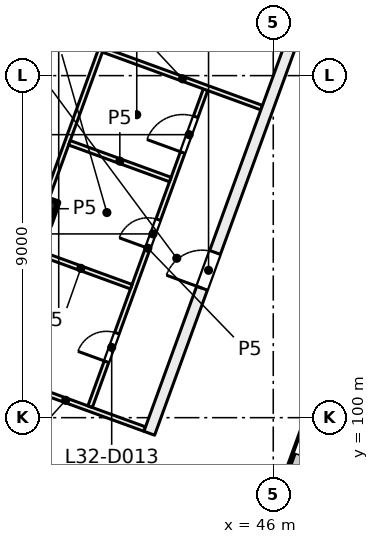
"""IFC4 building model, lengths in metres.
Left out: names, types, materials, properties, quantities, classifications, styles, units other than length and angle.
Written with IfcOpenShell. Run it as: python <this file> out.ifc"""

import sys

from ifc_helpers import new_model, si_unit, direction, frame, frame_2d, origin, origin_2d, place, context, subcontext, project, spatial, rectangle, extrude, element, fill, save


model = new_model("IFC4")
c1 = context("Model", 3, precision=1e-05, world=origin(), true_north=direction((0.0, 1.0)))
c2 = subcontext(c1, "Body", "Model", "MODEL_VIEW")
j1 = project(units=[si_unit("LENGTHUNIT", "METRE"), si_unit("PLANEANGLEUNIT", "RADIAN")], contexts=[c1])
p1 = place(None, origin())
s1 = spatial("IfcSite", under=j1, at=p1, CompositionType="ELEMENT")
p2 = place(p1, origin())
s2 = spatial("IfcBuilding", under=s1, at=p2, CompositionType="ELEMENT")
p3 = place(p2, frame((0.0, 0.0, 138.5)))
s3 = spatial("IfcBuildingStorey", under=s2, at=p3, CompositionType="ELEMENT", Elevation=138.5)
p4 = place(p3, frame((39.927, 105.468, 0.0), z_axis=(0.0, 0.0, 1.0), x_axis=(-0.342020143326, -0.939692620786, 0.0)))
e1 = element("IfcColumn", 1, at=p4, inside=s3, PredefinedType="COLUMN", context=c2, shape_type="SweptSolid", body=[
    extrude(rectangle(XDim=0.65, YDim=0.65, at=origin_2d()), origin(), (0.0, 0.0, 1.0), 4.0),
])
p5 = place(p3, frame((52.212, 113.783, 0.0), z_axis=(0.0, 0.0, 1.0), x_axis=(-0.34202521188, -0.939690775968, 0.0)))
e2 = element("IfcWall", 2, at=p5, inside=s3, PredefinedType="SOLIDWALL", context=c2, shape_type="SweptSolid", body=[
    extrude(rectangle(XDim=21.745, YDim=0.6, at=frame_2d((10.873, 0.0))), origin(), (0.0, 0.0, 1.0), 3.625),
])
p6 = place(p5, frame((3.765, 0.0, 0.9)))
e3 = element("IfcOpeningElement", 3, at=p6, cuts=e2, PredefinedType="OPENING", context=c2, shape_type="SweptSolid", body=[
    extrude(rectangle(XDim=3.0, YDim=2.4, at=frame_2d((1.5, 1.2))), frame((0.0, 0.31, 0.0), z_axis=(0.0, -1.0, 0.0), x_axis=(1.0, 0.0, 0.0)), (0.0, 0.0, 1.0), 0.62),
])
p7 = place(p5, frame((8.265, 0.0, 0.9)))
e4 = element("IfcOpeningElement", 4, at=p7, cuts=e2, PredefinedType="OPENING", context=c2, shape_type="SweptSolid", body=[
    extrude(rectangle(XDim=3.0, YDim=2.4, at=frame_2d((1.5, 1.2))), frame((0.0, 0.31, 0.0), z_axis=(0.0, -1.0, 0.0), x_axis=(1.0, 0.0, 0.0)), (0.0, 0.0, 1.0), 0.62),
])
p8 = place(p5, frame((12.765, 0.0, 0.9)))
e5 = element("IfcOpeningElement", 5, at=p8, cuts=e2, PredefinedType="OPENING", context=c2, shape_type="SweptSolid", body=[
    extrude(rectangle(XDim=3.0, YDim=2.4, at=frame_2d((1.5, 1.2))), frame((0.0, 0.31, 0.0), z_axis=(0.0, -1.0, 0.0), x_axis=(1.0, 0.0, 0.0)), (0.0, 0.0, 1.0), 0.62),
])
p9 = place(p5, frame((17.265, 0.0, 0.9)))
e6 = element("IfcOpeningElement", 6, at=p9, cuts=e2, PredefinedType="OPENING", context=c2, shape_type="SweptSolid", body=[
    extrude(rectangle(XDim=3.0, YDim=2.4, at=frame_2d((1.5, 1.2))), frame((0.0, 0.31, 0.0), z_axis=(0.0, -1.0, 0.0), x_axis=(1.0, 0.0, 0.0)), (0.0, 0.0, 1.0), 0.62),
])
p10 = place(p3, frame((38.455, 101.214, 0.0), z_axis=(0.0, 0.0, 1.0), x_axis=(0.939738687483, -0.341893549585, 0.0)))
e7 = element("IfcWall", 7, at=p10, inside=s3, PredefinedType="PARTITIONING", context=c2, shape_type="SweptSolid", body=[
    extrude(rectangle(XDim=4.429, YDim=0.125, at=frame_2d((2.214, 0.0))), origin(), (0.0, 0.0, 1.0), 3.625),
])
p11 = place(p3, frame((38.388, 101.24, 0.0), z_axis=(0.0, 0.0, 1.0), x_axis=(0.342067486799, 0.93967538782, 0.0)))
e8 = element("IfcWall", 8, at=p11, inside=s3, PredefinedType="PARTITIONING", context=c2, shape_type="SweptSolid", body=[
    extrude(rectangle(XDim=9.063, YDim=0.125, at=frame_2d((4.531, 0.0))), origin(), (0.0, 0.0, 1.0), 3.625),
])
p12 = place(p3, frame((41.181, 100.29, 0.0), z_axis=(0.0, 0.0, 1.0), x_axis=(0.34222012082, 0.939619810831, 0.0)))
e9 = element("IfcWall", 9, at=p12, inside=s3, PredefinedType="PARTITIONING", context=c2, shape_type="SweptSolid", body=[
    extrude(rectangle(XDim=8.875, YDim=0.125, at=frame_2d((4.438, 0.0))), origin(), (0.0, 0.0, 1.0), 3.625),
])
p13 = place(p12, frame((1.258, 0.0, 0.0)))
e10 = element("IfcOpeningElement", 10, at=p13, cuts=e9, PredefinedType="OPENING", context=c2, shape_type="SweptSolid", body=[
    extrude(rectangle(XDim=0.8, YDim=2.1, at=frame_2d((0.4, 1.05))), frame((0.0, 0.073, 0.0), z_axis=(0.0, -1.0, 0.0), x_axis=(1.0, 0.0, 0.0)), (0.0, 0.0, 1.0), 0.145),
])
p14 = place(p12, frame((4.437, 0.0, 0.0)))
e11 = element("IfcOpeningElement", 11, at=p14, cuts=e9, PredefinedType="OPENING", context=c2, shape_type="SweptSolid", body=[
    extrude(rectangle(XDim=0.8, YDim=2.1, at=frame_2d((0.4, 1.05))), frame((0.0, 0.073, 0.0), z_axis=(0.0, -1.0, 0.0), x_axis=(1.0, 0.0, 0.0)), (0.0, 0.0, 1.0), 0.145),
])
p15 = place(p12, frame((7.116, 0.0, 0.0)))
e12 = element("IfcOpeningElement", 12, at=p15, cuts=e9, PredefinedType="OPENING", context=c2, shape_type="SweptSolid", body=[
    extrude(rectangle(XDim=1.0, YDim=2.1, at=frame_2d((0.5, 1.05))), frame((0.0, 0.073, 0.0), z_axis=(0.0, -1.0, 0.0), x_axis=(1.0, 0.0, 0.0)), (0.0, 0.0, 1.0), 0.145),
])
p16 = place(p3, frame((41.526, 109.676, 0.0), z_axis=(0.0, 0.0, 1.0), x_axis=(0.939577975992, -0.342334963203, 0.0)))
e13 = element("IfcWall", 13, at=p16, inside=s3, PredefinedType="PARTITIONING", context=c2, shape_type="SweptSolid", body=[
    extrude(rectangle(XDim=4.437, YDim=0.125, at=frame_2d((2.219, 0.0))), origin(), (0.0, 0.0, 1.0), 3.625),
])
p17 = place(p3, frame((42.264, 103.446, 0.0), z_axis=(0.0, 0.0, 1.0), x_axis=(-0.939563555473, 0.342374539396, 0.0)))
e14 = element("IfcWall", 14, at=p17, inside=s3, PredefinedType="PARTITIONING", context=c2, shape_type="SweptSolid", body=[
    extrude(rectangle(XDim=2.824, YDim=0.125, at=frame_2d((1.412, 0.0))), origin(), (0.0, 0.0, 1.0), 3.625),
])
p18 = place(p3, frame((42.737, 99.59, 0.0), z_axis=(0.0, 0.0, 1.0), x_axis=(0.341992703977, 0.939702607438, 0.0)))
e15 = element("IfcWall", 15, at=p18, inside=s3, PredefinedType="PARTITIONING", context=c2, shape_type="SweptSolid", body=[
    extrude(rectangle(XDim=23.006, YDim=0.3, at=frame_2d((11.503, 0.0))), origin(), (0.0, 0.0, 1.0), 3.625),
])
p19 = place(p18, frame((4.062, 0.0, 0.0)))
e16 = element("IfcOpeningElement", 16, at=p19, cuts=e15, PredefinedType="OPENING", context=c2, shape_type="SweptSolid", body=[
    extrude(rectangle(XDim=1.0, YDim=2.1, at=frame_2d((0.5, 1.05))), frame((0.0, 0.16, 0.0), z_axis=(0.0, -1.0, 0.0), x_axis=(1.0, 0.0, 0.0)), (0.0, 0.0, 1.0), 0.32),
])
p20 = place(p18, frame((14.912, 0.0, 0.0)))
e17 = element("IfcOpeningElement", 17, at=p20, cuts=e15, PredefinedType="OPENING", context=c2, shape_type="SweptSolid", body=[
    extrude(rectangle(XDim=1.8, YDim=2.1, at=frame_2d((0.9, 1.05))), frame((0.0, 0.16, 0.0), z_axis=(0.0, -1.0, 0.0), x_axis=(1.0, 0.0, 0.0)), (0.0, 0.0, 1.0), 0.32),
])
p21 = place(p3, frame((43.29, 106.266, 0.0), z_axis=(0.0, 0.0, 1.0), x_axis=(-0.939601484935, 0.342270433294, 0.0)))
e18 = element("IfcWall", 18, at=p21, inside=s3, PredefinedType="PARTITIONING", context=c2, shape_type="SweptSolid", body=[
    extrude(rectangle(XDim=2.825, YDim=0.125, at=frame_2d((1.412, 0.0))), origin(), (0.0, 0.0, 1.0), 3.625),
])
p22 = place(p19, origin())
e19 = element("IfcDoor", 19, at=p22, inside=s3, OperationType="SINGLE_SWING_LEFT", PredefinedType="DOOR", context=c2, shape_type="SweptSolid", body=[
    extrude(rectangle(XDim=1.0, YDim=2.1, at=frame_2d((0.5, 1.05))), frame((0.0, 0.025, 0.0), z_axis=(0.0, -1.0, 0.0), x_axis=(1.0, 0.0, 0.0)), (0.0, 0.0, 1.0), 0.05),
])
fill(e16, e19)
p23 = place(p13, origin())
e20 = element("IfcDoor", 20, at=p23, inside=s3, OperationType="SINGLE_SWING_LEFT", PredefinedType="DOOR", context=c2, shape_type="SweptSolid", body=[
    extrude(rectangle(XDim=0.8, YDim=2.1, at=frame_2d((0.4, 1.05))), frame((0.0, 0.025, 0.0), z_axis=(0.0, -1.0, 0.0), x_axis=(1.0, 0.0, 0.0)), (0.0, 0.0, 1.0), 0.05),
])
fill(e10, e20)
p24 = place(p14, origin())
e21 = element("IfcDoor", 21, at=p24, inside=s3, OperationType="SINGLE_SWING_LEFT", PredefinedType="DOOR", context=c2, shape_type="SweptSolid", body=[
    extrude(rectangle(XDim=0.8, YDim=2.1, at=frame_2d((0.4, 1.05))), frame((0.0, 0.025, 0.0), z_axis=(0.0, -1.0, 0.0), x_axis=(1.0, 0.0, 0.0)), (0.0, 0.0, 1.0), 0.05),
])
fill(e11, e21)
p25 = place(p15, origin())
e22 = element("IfcDoor", 22, at=p25, inside=s3, OperationType="SINGLE_SWING_LEFT", PredefinedType="DOOR", context=c2, shape_type="SweptSolid", body=[
    extrude(rectangle(XDim=1.0, YDim=2.1, at=frame_2d((0.5, 1.05))), frame((0.0, 0.025, 0.0), z_axis=(0.0, -1.0, 0.0), x_axis=(1.0, 0.0, 0.0)), (0.0, 0.0, 1.0), 0.05),
])
fill(e12, e22)
save(model, sys.argv[1])
